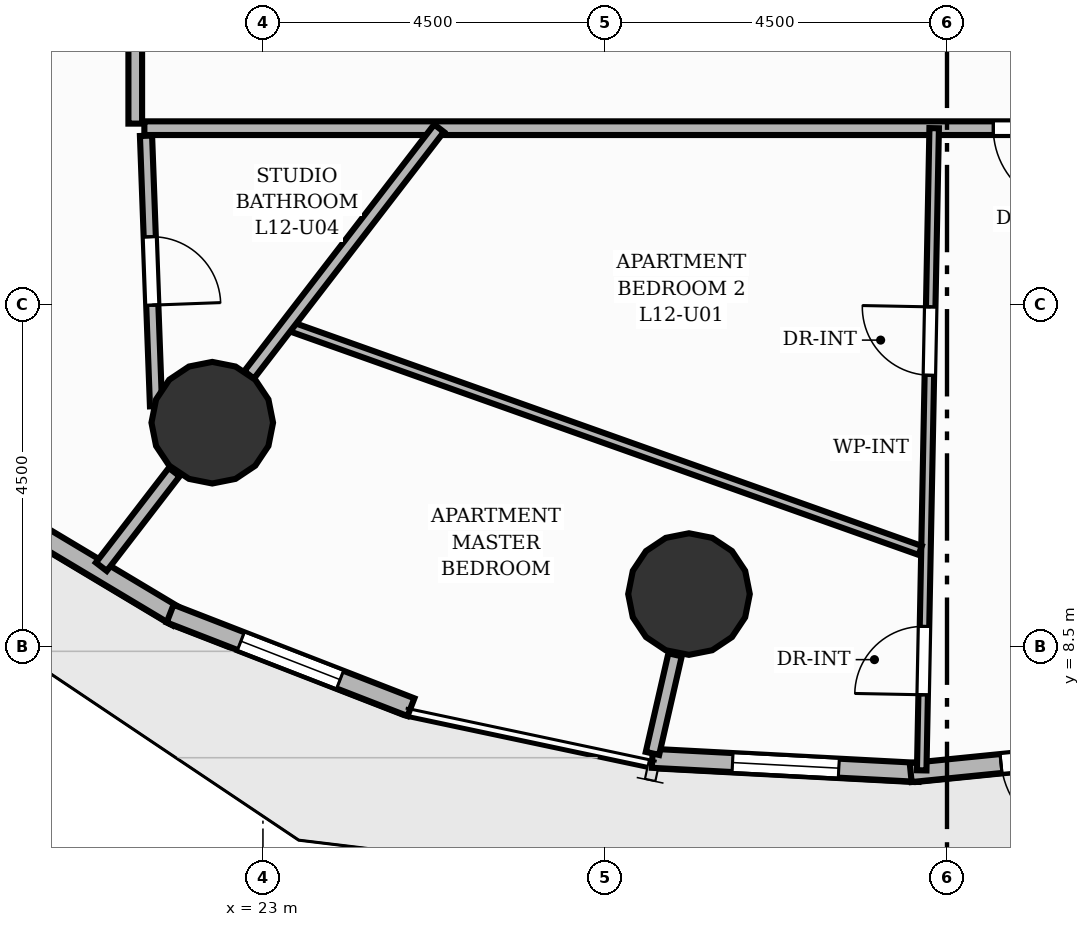
"""IFC4 building model, lengths in metres.
Left out: names, types, materials, properties, quantities, classifications, styles, units other than length and angle.
Written with IfcOpenShell. Run it as: python <this file> out.ifc"""

import sys

from ifc_helpers import new_model, si_unit, direction, frame, frame_2d, origin, origin_2d, place, context, subcontext, project, spatial, rectangle, circle, extrude, element, fill, save


model = new_model("IFC4")
c1 = context("Model", 3, precision=1e-05, world=origin(), true_north=direction((0.0, 1.0)))
c2 = subcontext(c1, "Body", "Model", "MODEL_VIEW")
j1 = project(units=[si_unit("LENGTHUNIT", "METRE"), si_unit("PLANEANGLEUNIT", "RADIAN")], contexts=[c1])
p1 = place(None, origin())
s1 = spatial("IfcSite", under=j1, at=p1, CompositionType="ELEMENT")
p2 = place(p1, origin())
s2 = spatial("IfcBuilding", under=s1, at=p2, CompositionType="ELEMENT")
p3 = place(p2, frame((0.0, 0.0, 44.0)))
s3 = spatial("IfcBuildingStorey", under=s2, at=p3, CompositionType="ELEMENT", Elevation=44.0)
for number, where, z_axis, x_axis in (
    (1, (22.333, 11.445, 0.0), (0.0, 0.0, 1.0), (1.0, 0.0, 0.0)),
    (2, (28.605, 9.19, 0.0), (0.0, 0.0, 1.0), (1.0, 0.0, 0.0)),
):
    element("IfcColumn", number, at=place(p3, frame(where, z_axis=z_axis, x_axis=x_axis)), inside=s3, PredefinedType="COLUMN", context=c2, shape_type="SweptSolid", body=[
        extrude(circle(Radius=0.8, at=origin_2d()), origin(), (0.0, 0.0, 1.0), 3.2),
    ])
p4 = place(p3, frame((21.878, 8.884, 0.0), z_axis=(0.0, 0.0, 1.0), x_axis=(-0.858069400356, 0.513533742001, 0.0)))
e3 = element("IfcWall", 3, at=p4, inside=s3, PredefinedType="SOLIDWALL", context=c2, shape_type="SweptSolid", body=[
    extrude(rectangle(XDim=3.323, YDim=0.25, at=frame_2d((1.661, 0.0))), origin(), (0.0, 0.0, 1.0), 2.96),
])
p5 = place(p3, frame((24.947, 7.702, 0.0), z_axis=(0.0, 0.0, 1.0), x_axis=(-0.932140755825, 0.362096135479, 0.0)))
e4 = element("IfcWall", 4, at=p5, inside=s3, PredefinedType="SOLIDWALL", context=c2, shape_type="SweptSolid", body=[
    extrude(rectangle(XDim=3.399, YDim=0.25, at=frame_2d((1.699, 0.0))), origin(), (0.0, 0.0, 1.0), 2.96),
])
p6 = place(p5, frame((1.0, 0.0, 0.85)))
e5 = element("IfcOpeningElement", 5, at=p6, cuts=e4, PredefinedType="OPENING", context=c2, shape_type="SweptSolid", body=[
    extrude(rectangle(XDim=1.4, YDim=1.55, at=frame_2d((0.7, 0.775))), frame((0.0, 0.135, 0.0), z_axis=(0.0, -1.0, 0.0), x_axis=(1.0, 0.0, 0.0)), (0.0, 0.0, 1.0), 0.27),
])
p7 = place(p3, frame((31.631, 6.844, 0.0), z_axis=(0.0, 0.0, 1.0), x_axis=(-0.99860782827, 0.052748510102, 0.0)))
e6 = element("IfcWall", 6, at=p7, inside=s3, PredefinedType="SOLIDWALL", context=c2, shape_type="SweptSolid", body=[
    extrude(rectangle(XDim=3.513, YDim=0.25, at=frame_2d((1.756, 0.0))), origin(), (0.0, 0.0, 1.0), 2.96),
])
p8 = place(p7, frame((1.056, 0.0, 0.85)))
e7 = element("IfcOpeningElement", 7, at=p8, cuts=e6, PredefinedType="OPENING", context=c2, shape_type="SweptSolid", body=[
    extrude(rectangle(XDim=1.4, YDim=1.55, at=frame_2d((0.7, 0.775))), frame((0.0, 0.135, 0.0), z_axis=(0.0, -1.0, 0.0), x_axis=(1.0, 0.0, 0.0)), (0.0, 0.0, 1.0), 0.27),
])
p9 = place(p3, frame((35.043, 7.194, 0.0), z_axis=(0.0, 0.0, 1.0), x_axis=(-0.994996115016, -0.099913618207, 0.0)))
e8 = element("IfcWall", 8, at=p9, inside=s3, PredefinedType="SOLIDWALL", context=c2, shape_type="SweptSolid", body=[
    extrude(rectangle(XDim=3.538, YDim=0.25, at=frame_2d((1.769, 0.0))), origin(), (0.0, 0.0, 1.0), 2.96),
])
p10 = place(p9, frame((1.194, 0.0, 0.0)))
e9 = element("IfcOpeningElement", 9, at=p10, cuts=e8, PredefinedType="OPENING", context=c2, shape_type="SweptSolid", body=[
    extrude(rectangle(XDim=1.15, YDim=2.2, at=frame_2d((0.575, 1.1))), frame((0.0, 0.135, 0.0), z_axis=(0.0, -1.0, 0.0), x_axis=(1.0, 0.0, 0.0)), (0.0, 0.0, 1.0), 0.27),
])
p11 = place(p3, frame((21.833, 10.795, 0.0), z_axis=(0.0, 0.0, 1.0), x_axis=(-0.609965884242, -0.792427674971, 0.0)))
e10 = element("IfcWall", 10, at=p11, inside=s3, PredefinedType="PARTITIONING", context=c2, shape_type="SweptSolid", body=[
    extrude(rectangle(XDim=1.572, YDim=0.18, at=frame_2d((0.786, 0.0))), origin(), (0.0, 0.0, 1.0), 2.178),
])
p12 = place(p3, frame((28.422, 8.391, 0.0), z_axis=(0.0, 0.0, 1.0), x_axis=(-0.223372526283, -0.974733150407, 0.0)))
e11 = element("IfcWall", 11, at=p12, inside=s3, PredefinedType="PARTITIONING", context=c2, shape_type="SweptSolid", body=[
    extrude(rectangle(XDim=1.331, YDim=0.18, at=frame_2d((0.666, 0.0))), origin(), (0.0, 0.0, 1.0), 2.178),
])
p13 = place(p3, frame((42.68, 15.32, 0.0), z_axis=(0.0, 0.0, 1.0), x_axis=(-1.0, 0.0, 0.0)))
e12 = element("IfcWall", 12, at=p13, inside=s3, PredefinedType="PARTITIONING", context=c2, shape_type="SweptSolid", body=[
    extrude(rectangle(XDim=21.24, YDim=0.18, at=frame_2d((10.62, 0.0))), origin(), (0.0, 0.0, 1.0), 2.955),
])
p14 = place(p13, frame((9.021, 0.0, 0.0)))
e13 = element("IfcOpeningElement", 13, at=p14, cuts=e12, PredefinedType="OPENING", context=c2, shape_type="SweptSolid", body=[
    extrude(rectangle(XDim=1.05, YDim=2.15, at=frame_2d((0.525, 1.075))), frame((0.0, 0.1, 0.0), z_axis=(0.0, -1.0, 0.0), x_axis=(1.0, 0.0, 0.0)), (0.0, 0.0, 1.0), 0.2),
])
p15 = place(p3, frame((21.32, 15.38, 0.0), z_axis=(0.0, 0.0, 1.0), x_axis=(0.0, 1.0, 0.0)))
e14 = element("IfcWall", 14, at=p15, inside=s3, PredefinedType="PARTITIONING", context=c2, shape_type="SweptSolid", body=[
    extrude(rectangle(XDim=17.3, YDim=0.18, at=frame_2d((8.65, 0.0))), origin(), (0.0, 0.0, 1.0), 2.955),
])
p16 = place(p15, frame((8.125, 0.0, 0.0)))
e15 = element("IfcOpeningElement", 15, at=p16, cuts=e14, PredefinedType="OPENING", context=c2, shape_type="SweptSolid", body=[
    extrude(rectangle(XDim=1.05, YDim=2.15, at=frame_2d((0.525, 1.075))), frame((0.0, 0.1, 0.0), z_axis=(0.0, -1.0, 0.0), x_axis=(1.0, 0.0, 0.0)), (0.0, 0.0, 1.0), 0.2),
])
p17 = place(p3, frame((31.667, 6.871, 0.0), z_axis=(0.0, 0.0, 1.0), x_axis=(0.019442133322, 0.999810983862, 0.0)))
e16 = element("IfcWall", 16, at=p17, inside=s3, PredefinedType="PARTITIONING", context=c2, shape_type="SweptSolid", body=[
    extrude(rectangle(XDim=8.451, YDim=0.125, at=frame_2d((4.226, 0.0))), origin(), (0.0, 0.0, 1.0), 2.955),
])
p18 = place(p17, frame((0.994, 0.0, 0.0)))
e17 = element("IfcOpeningElement", 17, at=p18, cuts=e16, PredefinedType="OPENING", context=c2, shape_type="SweptSolid", body=[
    extrude(rectangle(XDim=0.9, YDim=2.1, at=frame_2d((0.45, 1.05))), frame((0.0, 0.073, 0.0), z_axis=(0.0, -1.0, 0.0), x_axis=(1.0, 0.0, 0.0)), (0.0, 0.0, 1.0), 0.145),
])
p19 = place(p17, frame((5.199, 0.0, 0.0)))
e18 = element("IfcOpeningElement", 18, at=p19, cuts=e16, PredefinedType="OPENING", context=c2, shape_type="SweptSolid", body=[
    extrude(rectangle(XDim=0.9, YDim=2.1, at=frame_2d((0.45, 1.05))), frame((0.0, 0.073, 0.0), z_axis=(0.0, -1.0, 0.0), x_axis=(1.0, 0.0, 0.0)), (0.0, 0.0, 1.0), 0.145),
])
p20 = place(p3, frame((23.319, 12.725, 0.0), z_axis=(0.0, 0.0, 1.0), x_axis=(0.942235806182, -0.334950273248, 0.0)))
e19 = element("IfcWall", 19, at=p20, inside=s3, PredefinedType="PARTITIONING", context=c2, shape_type="SweptSolid", body=[
    extrude(rectangle(XDim=8.839, YDim=0.125, at=frame_2d((4.419, 0.0))), origin(), (0.0, 0.0, 1.0), 2.955),
])
p21 = place(p3, frame((22.818, 12.074, 0.0), z_axis=(0.0, 0.0, 1.0), x_axis=(0.61008798772, 0.792333671656, 0.0)))
e20 = element("IfcWall", 20, at=p21, inside=s3, PredefinedType="PLUMBINGWALL", context=c2, shape_type="SweptSolid", body=[
    extrude(rectangle(XDim=4.097, YDim=0.16, at=frame_2d((2.048, 0.0))), origin(), (0.0, 0.0, 1.0), 2.178),
])
p22 = place(p3, frame((21.461, 15.22, 0.0), z_axis=(0.0, 0.0, 1.0), x_axis=(0.037031951983, -0.999314082024, 0.0)))
e21 = element("IfcWall", 21, at=p22, inside=s3, PredefinedType="PLUMBINGWALL", context=c2, shape_type="SweptSolid", body=[
    extrude(rectangle(XDim=3.56, YDim=0.16, at=frame_2d((1.78, 0.0))), origin(), (0.0, 0.0, 1.0), 2.955),
])
p23 = place(p22, frame((1.33, 0.0, 0.0)))
e22 = element("IfcOpeningElement", 22, at=p23, cuts=e21, PredefinedType="OPENING", context=c2, shape_type="SweptSolid", body=[
    extrude(rectangle(XDim=0.9, YDim=2.1, at=frame_2d((0.45, 1.05))), frame((0.0, 0.09, 0.0), z_axis=(0.0, -1.0, 0.0), x_axis=(1.0, 0.0, 0.0)), (0.0, 0.0, 1.0), 0.18),
])
p24 = place(p10, origin())
e23 = element("IfcDoor", 23, at=p24, inside=s3, OperationType="SINGLE_SWING_LEFT", PredefinedType="DOOR", context=c2, shape_type="SweptSolid", body=[
    extrude(rectangle(XDim=1.15, YDim=2.2, at=frame_2d((0.575, 1.1))), frame((0.0, 0.025, 0.0), z_axis=(0.0, -1.0, 0.0), x_axis=(1.0, 0.0, 0.0)), (0.0, 0.0, 1.0), 0.05),
])
fill(e9, e23)
p25 = place(p6, origin())
e24 = element("IfcWindow", 24, at=p25, inside=s3, PartitioningType="SINGLE_PANEL", PredefinedType="WINDOW", context=c2, shape_type="SweptSolid", body=[
    extrude(rectangle(XDim=1.4, YDim=1.55, at=frame_2d((0.7, 0.775))), frame((0.0, 0.03, 0.0), z_axis=(0.0, -1.0, 0.0), x_axis=(1.0, 0.0, 0.0)), (0.0, 0.0, 1.0), 0.06),
])
fill(e5, e24)
p26 = place(p8, origin())
e25 = element("IfcWindow", 25, at=p26, inside=s3, PartitioningType="SINGLE_PANEL", PredefinedType="WINDOW", context=c2, shape_type="SweptSolid", body=[
    extrude(rectangle(XDim=1.4, YDim=1.55, at=frame_2d((0.7, 0.775))), frame((0.0, 0.03, 0.0), z_axis=(0.0, -1.0, 0.0), x_axis=(1.0, 0.0, 0.0)), (0.0, 0.0, 1.0), 0.06),
])
fill(e7, e25)
p27 = place(p14, origin())
e26 = element("IfcDoor", 26, at=p27, inside=s3, OperationType="SINGLE_SWING_LEFT", PredefinedType="DOOR", context=c2, shape_type="SweptSolid", body=[
    extrude(rectangle(XDim=1.05, YDim=2.15, at=frame_2d((0.525, 1.075))), frame((0.0, 0.025, 0.0), z_axis=(0.0, -1.0, 0.0), x_axis=(1.0, 0.0, 0.0)), (0.0, 0.0, 1.0), 0.05),
])
fill(e13, e26)
p28 = place(p18, origin())
e27 = element("IfcDoor", 27, at=p28, inside=s3, OperationType="SINGLE_SWING_LEFT", PredefinedType="DOOR", context=c2, shape_type="SweptSolid", body=[
    extrude(rectangle(XDim=0.9, YDim=2.1, at=frame_2d((0.45, 1.05))), frame((0.0, 0.025, 0.0), z_axis=(0.0, -1.0, 0.0), x_axis=(1.0, 0.0, 0.0)), (0.0, 0.0, 1.0), 0.05),
])
fill(e17, e27)
p29 = place(p19, origin())
e28 = element("IfcDoor", 28, at=p29, inside=s3, OperationType="SINGLE_SWING_RIGHT", PredefinedType="DOOR", context=c2, shape_type="SweptSolid", body=[
    extrude(rectangle(XDim=0.9, YDim=2.1, at=frame_2d((0.45, 1.05))), frame((0.0, 0.025, 0.0), z_axis=(0.0, -1.0, 0.0), x_axis=(1.0, 0.0, 0.0)), (0.0, 0.0, 1.0), 0.05),
])
fill(e18, e28)
p30 = place(p23, origin())
e29 = element("IfcDoor", 29, at=p30, inside=s3, OperationType="SINGLE_SWING_RIGHT", PredefinedType="DOOR", context=c2, shape_type="SweptSolid", body=[
    extrude(rectangle(XDim=0.9, YDim=2.1, at=frame_2d((0.45, 1.05))), frame((0.0, 0.025, 0.0), z_axis=(0.0, -1.0, 0.0), x_axis=(1.0, 0.0, 0.0)), (0.0, 0.0, 1.0), 0.05),
])
fill(e22, e29)
save(model, sys.argv[1])
